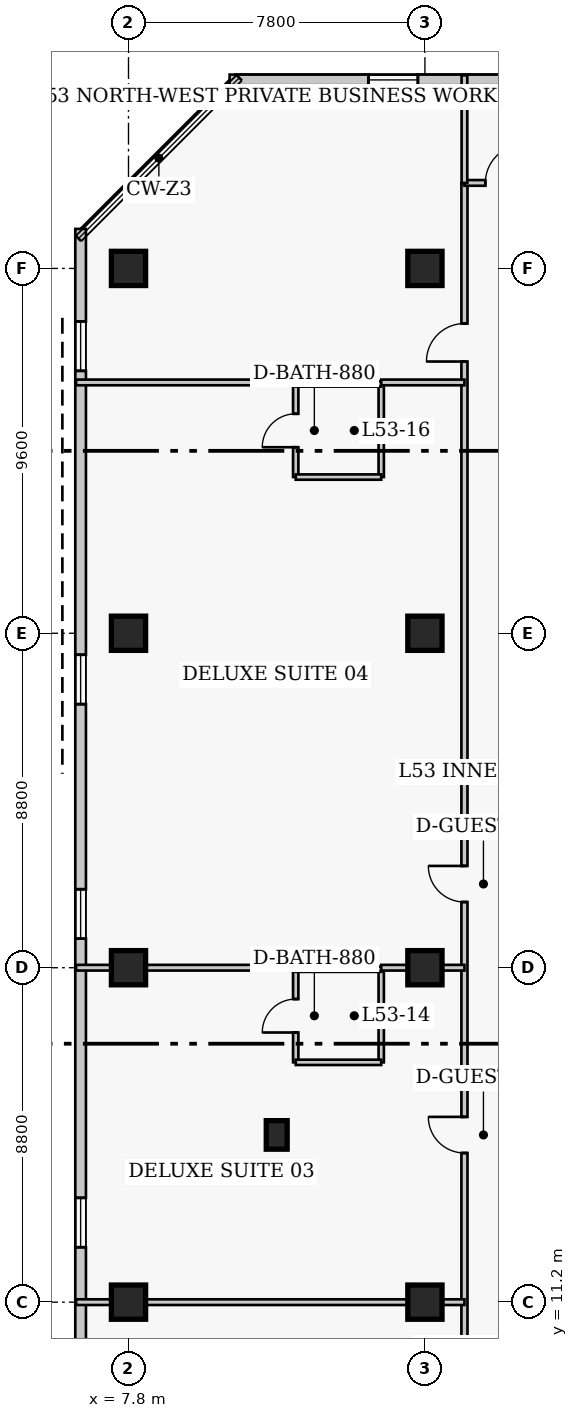
"""IFC4 building model, lengths in metres.
Left out: names, types, materials, properties, quantities, classifications, styles, units other than length and angle.
Written with IfcOpenShell. Run it as: python <this file> out.ifc"""

import sys

from ifc_helpers import new_model, si_unit, direction, frame, frame_2d, origin, origin_2d, place, context, subcontext, project, spatial, rectangle, extrude, element, fill, save


model = new_model("IFC4")
c1 = context("Model", 3, precision=1e-05, world=origin(), true_north=direction((0.0, 1.0)))
c2 = subcontext(c1, "Body", "Model", "MODEL_VIEW")
j1 = project(units=[si_unit("LENGTHUNIT", "METRE"), si_unit("PLANEANGLEUNIT", "RADIAN")], contexts=[c1])
p1 = place(None, origin())
s1 = spatial("IfcSite", under=j1, at=p1, CompositionType="ELEMENT")
p2 = place(p1, origin())
s2 = spatial("IfcBuilding", under=s1, at=p2, CompositionType="ELEMENT")
p3 = place(p2, frame((0.0, 0.0, 212.4)))
s3 = spatial("IfcBuildingStorey", under=s2, at=p3, CompositionType="ELEMENT", Elevation=212.4)
for number, where, z_axis, x_axis in (
    (1, (7.8, 11.2, 0.0), (0.0, 0.0, 1.0), (1.0, 0.0, 0.0)),
    (2, (7.8, 20.0, 0.0), (0.0, 0.0, 1.0), (1.0, 0.0, 0.0)),
    (3, (7.8, 28.8, 0.0), (0.0, 0.0, 1.0), (1.0, 0.0, 0.0)),
    (4, (7.8, 38.4, 0.0), (0.0, 0.0, 1.0), (1.0, 0.0, 0.0)),
    (5, (15.6, 11.2, 0.0), (0.0, 0.0, 1.0), (1.0, 0.0, 0.0)),
    (6, (15.6, 20.0, 0.0), (0.0, 0.0, 1.0), (1.0, 0.0, 0.0)),
    (7, (15.6, 28.8, 0.0), (0.0, 0.0, 1.0), (1.0, 0.0, 0.0)),
    (8, (15.6, 38.4, 0.0), (0.0, 0.0, 1.0), (1.0, 0.0, 0.0)),
):
    element("IfcColumn", number, at=place(p3, frame(where, z_axis=z_axis, x_axis=x_axis)), inside=s3, PredefinedType="COLUMN", context=c2, shape_type="SweptSolid", body=[
        extrude(rectangle(XDim=0.9, YDim=0.9, at=origin_2d()), origin(), (0.0, 0.0, 1.0), 3.9),
    ])
p4 = place(p3, frame((11.7, 15.6, 0.0), z_axis=(0.0, 0.0, 1.0), x_axis=(1.0, 0.0, 0.0)))
e9 = element("IfcColumn", 9, at=p4, inside=s3, PredefinedType="PILASTER", context=c2, shape_type="SweptSolid", body=[
    extrude(rectangle(XDim=0.55, YDim=0.75, at=origin_2d()), origin(), (0.0, 0.0, 1.0), 3.9),
])
p5 = place(p3, frame((36.29, 43.36, 0.0), z_axis=(0.0, 0.0, 1.0), x_axis=(-1.0, 0.0, 0.0)))
e10 = element("IfcWall", 10, at=p5, inside=s3, PredefinedType="SOLIDWALL", context=c2, shape_type="SweptSolid", body=[
    extrude(rectangle(XDim=25.83, YDim=0.28, at=frame_2d((12.915, 0.0))), origin(), (0.0, 0.0, 1.0), 3.65),
])
p6 = place(p5, frame((7.29, 0.0, 0.0)))
e11 = element("IfcOpeningElement", 11, at=p6, cuts=e10, PredefinedType="OPENING", context=c2, shape_type="SweptSolid", body=[
    extrude(rectangle(XDim=1.4, YDim=2.15, at=frame_2d((0.7, 1.075))), frame((0.0, 0.15, 0.0), z_axis=(0.0, -1.0, 0.0), x_axis=(1.0, 0.0, 0.0)), (0.0, 0.0, 1.0), 0.3),
])
p7 = place(p5, frame((3.005, 0.0, 0.85)))
e12 = element("IfcOpeningElement", 12, at=p7, cuts=e10, PredefinedType="OPENING", context=c2, shape_type="SweptSolid", body=[
    extrude(rectangle(XDim=1.3, YDim=1.7, at=frame_2d((0.65, 0.85))), frame((0.0, 0.15, 0.0), z_axis=(0.0, -1.0, 0.0), x_axis=(1.0, 0.0, 0.0)), (0.0, 0.0, 1.0), 0.3),
])
p8 = place(p5, frame((12.265, 0.0, 0.85)))
e13 = element("IfcOpeningElement", 13, at=p8, cuts=e10, PredefinedType="OPENING", context=c2, shape_type="SweptSolid", body=[
    extrude(rectangle(XDim=1.3, YDim=1.7, at=frame_2d((0.65, 0.85))), frame((0.0, 0.15, 0.0), z_axis=(0.0, -1.0, 0.0), x_axis=(1.0, 0.0, 0.0)), (0.0, 0.0, 1.0), 0.3),
])
p9 = place(p5, frame((20.875, 0.0, 0.85)))
e14 = element("IfcOpeningElement", 14, at=p9, cuts=e10, PredefinedType="OPENING", context=c2, shape_type="SweptSolid", body=[
    extrude(rectangle(XDim=1.3, YDim=1.7, at=frame_2d((0.65, 0.85))), frame((0.0, 0.15, 0.0), z_axis=(0.0, -1.0, 0.0), x_axis=(1.0, 0.0, 0.0)), (0.0, 0.0, 1.0), 0.3),
])
p10 = place(p3, frame((6.54, 39.44, 0.0), z_axis=(0.0, 0.0, 1.0), x_axis=(0.0, -1.0, 0.0)))
e15 = element("IfcWall", 15, at=p10, inside=s3, PredefinedType="SOLIDWALL", context=c2, shape_type="SweptSolid", body=[
    extrude(rectangle(XDim=29.88, YDim=0.28, at=frame_2d((14.94, 0.0))), origin(), (0.0, 0.0, 1.0), 3.65),
])
p11 = place(p10, frame((2.435, 0.0, 0.85)))
e16 = element("IfcOpeningElement", 16, at=p11, cuts=e15, PredefinedType="OPENING", context=c2, shape_type="SweptSolid", body=[
    extrude(rectangle(XDim=1.3, YDim=1.7, at=frame_2d((0.65, 0.85))), frame((0.0, 0.15, 0.0), z_axis=(0.0, -1.0, 0.0), x_axis=(1.0, 0.0, 0.0)), (0.0, 0.0, 1.0), 0.3),
])
p12 = place(p10, frame((11.205, 0.0, 0.85)))
e17 = element("IfcOpeningElement", 17, at=p12, cuts=e15, PredefinedType="OPENING", context=c2, shape_type="SweptSolid", body=[
    extrude(rectangle(XDim=1.3, YDim=1.7, at=frame_2d((0.65, 0.85))), frame((0.0, 0.15, 0.0), z_axis=(0.0, -1.0, 0.0), x_axis=(1.0, 0.0, 0.0)), (0.0, 0.0, 1.0), 0.3),
])
p13 = place(p10, frame((17.375, 0.0, 0.85)))
e18 = element("IfcOpeningElement", 18, at=p13, cuts=e15, PredefinedType="OPENING", context=c2, shape_type="SweptSolid", body=[
    extrude(rectangle(XDim=1.3, YDim=1.7, at=frame_2d((0.65, 0.85))), frame((0.0, 0.15, 0.0), z_axis=(0.0, -1.0, 0.0), x_axis=(1.0, 0.0, 0.0)), (0.0, 0.0, 1.0), 0.3),
])
p14 = place(p10, frame((25.495, 0.0, 0.85)))
e19 = element("IfcOpeningElement", 19, at=p14, cuts=e15, PredefinedType="OPENING", context=c2, shape_type="SweptSolid", body=[
    extrude(rectangle(XDim=1.3, YDim=1.7, at=frame_2d((0.65, 0.85))), frame((0.0, 0.15, 0.0), z_axis=(0.0, -1.0, 0.0), x_axis=(1.0, 0.0, 0.0)), (0.0, 0.0, 1.0), 0.3),
])
p15 = place(p3, frame((16.64, 7.55, 0.0), z_axis=(0.0, 0.0, 1.0), x_axis=(0.0, 1.0, 0.0)))
e20 = element("IfcWall", 20, at=p15, inside=s3, PredefinedType="PARTITIONING", context=c2, shape_type="SweptSolid", body=[
    extrude(rectangle(XDim=33.1, YDim=0.16, at=frame_2d((16.55, 0.0))), origin(), (0.0, 0.0, 1.0), 3.65),
])
p16 = place(p15, frame((0.46, 0.0, 0.0)))
e21 = element("IfcOpeningElement", 21, at=p16, cuts=e20, PredefinedType="OPENING", context=c2, shape_type="SweptSolid", body=[
    extrude(rectangle(XDim=0.95, YDim=2.1, at=frame_2d((0.475, 1.05))), frame((0.0, 0.09, 0.0), z_axis=(0.0, -1.0, 0.0), x_axis=(1.0, 0.0, 0.0)), (0.0, 0.0, 1.0), 0.18),
])
p17 = place(p15, frame((7.575, 0.0, 0.0)))
e22 = element("IfcOpeningElement", 22, at=p17, cuts=e20, PredefinedType="OPENING", context=c2, shape_type="SweptSolid", body=[
    extrude(rectangle(XDim=0.95, YDim=2.1, at=frame_2d((0.475, 1.05))), frame((0.0, 0.09, 0.0), z_axis=(0.0, -1.0, 0.0), x_axis=(1.0, 0.0, 0.0)), (0.0, 0.0, 1.0), 0.18),
])
p18 = place(p15, frame((14.178, 0.0, 0.0)))
e23 = element("IfcOpeningElement", 23, at=p18, cuts=e20, PredefinedType="OPENING", context=c2, shape_type="SweptSolid", body=[
    extrude(rectangle(XDim=0.95, YDim=2.1, at=frame_2d((0.475, 1.05))), frame((0.0, 0.09, 0.0), z_axis=(0.0, -1.0, 0.0), x_axis=(1.0, 0.0, 0.0)), (0.0, 0.0, 1.0), 0.18),
])
p19 = place(p15, frame((28.4, 0.0, 0.0)))
e24 = element("IfcOpeningElement", 24, at=p19, cuts=e20, PredefinedType="OPENING", context=c2, shape_type="SweptSolid", body=[
    extrude(rectangle(XDim=1.0, YDim=2.15, at=frame_2d((0.5, 1.075))), frame((0.0, 0.09, 0.0), z_axis=(0.0, -1.0, 0.0), x_axis=(1.0, 0.0, 0.0)), (0.0, 0.0, 1.0), 0.18),
])
p20 = place(p3, frame((16.64, 40.65, 0.0), z_axis=(0.0, 0.0, 1.0), x_axis=(1.0, 0.0, 0.0)))
e25 = element("IfcWall", 25, at=p20, inside=s3, PredefinedType="PARTITIONING", context=c2, shape_type="SweptSolid", body=[
    extrude(rectangle(XDim=5.46, YDim=0.15, at=frame_2d((2.73, 0.0))), origin(), (0.0, 0.0, 1.0), 3.65),
])
p21 = place(p20, frame((0.55, 0.0, 0.0)))
e26 = element("IfcOpeningElement", 26, at=p21, cuts=e25, PredefinedType="OPENING", context=c2, shape_type="SweptSolid", body=[
    extrude(rectangle(XDim=1.0, YDim=2.15, at=frame_2d((0.5, 1.075))), frame((0.0, 0.085, 0.0), z_axis=(0.0, -1.0, 0.0), x_axis=(1.0, 0.0, 0.0)), (0.0, 0.0, 1.0), 0.17),
])
p22 = place(p3, frame((16.64, 40.65, 0.0), z_axis=(0.0, 0.0, 1.0), x_axis=(0.0, 1.0, 0.0)))
e27 = element("IfcWall", 27, at=p22, inside=s3, PredefinedType="PARTITIONING", context=c2, shape_type="SweptSolid", body=[
    extrude(rectangle(XDim=2.83, YDim=0.15, at=frame_2d((1.415, 0.0))), origin(), (0.0, 0.0, 1.0), 3.65),
])
p23 = place(p3, frame((6.42, 11.2, 0.0), z_axis=(0.0, 0.0, 1.0), x_axis=(1.0, 0.0, 0.0)))
e28 = element("IfcWall", 28, at=p23, inside=s3, PredefinedType="PARTITIONING", context=c2, shape_type="SweptSolid", body=[
    extrude(rectangle(XDim=10.22, YDim=0.15, at=frame_2d((5.11, 0.0))), origin(), (0.0, 0.0, 1.0), 2.878),
])
p24 = place(p3, frame((12.2, 17.51, 0.0), z_axis=(0.0, 0.0, 1.0), x_axis=(0.0, 1.0, 0.0)))
e29 = element("IfcWall", 29, at=p24, inside=s3, PredefinedType="PLUMBINGWALL", context=c2, shape_type="SweptSolid", body=[
    extrude(rectangle(XDim=2.45, YDim=0.14, at=frame_2d((1.225, 0.0))), origin(), (0.0, 0.0, 1.0), 3.65),
])
p25 = place(p24, frame((0.785, 0.0, 0.0)))
e30 = element("IfcOpeningElement", 30, at=p25, cuts=e29, PredefinedType="OPENING", context=c2, shape_type="SweptSolid", body=[
    extrude(rectangle(XDim=0.88, YDim=2.05, at=frame_2d((0.44, 1.025))), frame((0.0, 0.08, 0.0), z_axis=(0.0, -1.0, 0.0), x_axis=(1.0, 0.0, 0.0)), (0.0, 0.0, 1.0), 0.16),
])
p26 = place(p3, frame((14.45, 17.51, 0.0), z_axis=(0.0, 0.0, 1.0), x_axis=(0.0, 1.0, 0.0)))
e31 = element("IfcWall", 31, at=p26, inside=s3, PredefinedType="PLUMBINGWALL", context=c2, shape_type="SweptSolid", body=[
    extrude(rectangle(XDim=2.45, YDim=0.14, at=frame_2d((1.225, 0.0))), origin(), (0.0, 0.0, 1.0), 3.65),
])
p27 = place(p3, frame((12.2, 17.51, 0.0), z_axis=(0.0, 0.0, 1.0), x_axis=(1.0, 0.0, 0.0)))
e32 = element("IfcWall", 32, at=p27, inside=s3, PredefinedType="PLUMBINGWALL", context=c2, shape_type="SweptSolid", body=[
    extrude(rectangle(XDim=2.25, YDim=0.14, at=frame_2d((1.125, 0.0))), origin(), (0.0, 0.0, 1.0), 3.65),
])
p28 = place(p3, frame((12.2, 19.96, 0.0), z_axis=(0.0, 0.0, 1.0), x_axis=(1.0, 0.0, 0.0)))
e33 = element("IfcWall", 33, at=p28, inside=s3, PredefinedType="PLUMBINGWALL", context=c2, shape_type="SweptSolid", body=[
    extrude(rectangle(XDim=2.25, YDim=0.14, at=frame_2d((1.125, 0.0))), origin(), (0.0, 0.0, 1.0), 3.038),
])
p29 = place(p3, frame((6.42, 20.0, 0.0), z_axis=(0.0, 0.0, 1.0), x_axis=(1.0, 0.0, 0.0)))
e34 = element("IfcWall", 34, at=p29, inside=s3, PredefinedType="PARTITIONING", context=c2, shape_type="SweptSolid", body=[
    extrude(rectangle(XDim=5.78, YDim=0.15, at=frame_2d((2.89, 0.0))), origin(), (0.0, 0.0, 1.0), 2.878),
])
p30 = place(p3, frame((14.45, 20.0, 0.0), z_axis=(0.0, 0.0, 1.0), x_axis=(1.0, 0.0, 0.0)))
e35 = element("IfcWall", 35, at=p30, inside=s3, PredefinedType="PARTITIONING", context=c2, shape_type="SweptSolid", body=[
    extrude(rectangle(XDim=2.19, YDim=0.15, at=frame_2d((1.095, 0.0))), origin(), (0.0, 0.0, 1.0), 2.878),
])
p31 = place(p3, frame((12.2, 32.91, 0.0), z_axis=(0.0, 0.0, 1.0), x_axis=(0.0, 1.0, 0.0)))
e36 = element("IfcWall", 36, at=p31, inside=s3, PredefinedType="PLUMBINGWALL", context=c2, shape_type="SweptSolid", body=[
    extrude(rectangle(XDim=2.45, YDim=0.14, at=frame_2d((1.225, 0.0))), origin(), (0.0, 0.0, 1.0), 3.65),
])
p32 = place(p31, frame((0.785, 0.0, 0.0)))
e37 = element("IfcOpeningElement", 37, at=p32, cuts=e36, PredefinedType="OPENING", context=c2, shape_type="SweptSolid", body=[
    extrude(rectangle(XDim=0.88, YDim=2.05, at=frame_2d((0.44, 1.025))), frame((0.0, 0.08, 0.0), z_axis=(0.0, -1.0, 0.0), x_axis=(1.0, 0.0, 0.0)), (0.0, 0.0, 1.0), 0.16),
])
p33 = place(p3, frame((14.45, 32.91, 0.0), z_axis=(0.0, 0.0, 1.0), x_axis=(0.0, 1.0, 0.0)))
e38 = element("IfcWall", 38, at=p33, inside=s3, PredefinedType="PLUMBINGWALL", context=c2, shape_type="SweptSolid", body=[
    extrude(rectangle(XDim=2.45, YDim=0.14, at=frame_2d((1.225, 0.0))), origin(), (0.0, 0.0, 1.0), 3.65),
])
for number, where, z_axis, x_axis in (
    (39, (12.2, 32.91, 0.0), (0.0, 0.0, 1.0), (1.0, 0.0, 0.0)),
    (40, (12.2, 35.36, 0.0), (0.0, 0.0, 1.0), (1.0, 0.0, 0.0)),
):
    element("IfcWall", number, at=place(p3, frame(where, z_axis=z_axis, x_axis=x_axis)), inside=s3, PredefinedType="PLUMBINGWALL", context=c2, shape_type="SweptSolid", body=[
        extrude(rectangle(XDim=2.25, YDim=0.14, at=frame_2d((1.125, 0.0))), origin(), (0.0, 0.0, 1.0), 3.65),
    ])
p34 = place(p3, frame((6.42, 35.4, 0.0), z_axis=(0.0, 0.0, 1.0), x_axis=(1.0, 0.0, 0.0)))
e41 = element("IfcWall", 41, at=p34, inside=s3, PredefinedType="PARTITIONING", context=c2, shape_type="SweptSolid", body=[
    extrude(rectangle(XDim=5.78, YDim=0.15, at=frame_2d((2.89, 0.0))), origin(), (0.0, 0.0, 1.0), 3.65),
])
p35 = place(p3, frame((14.45, 35.4, 0.0), z_axis=(0.0, 0.0, 1.0), x_axis=(1.0, 0.0, 0.0)))
e42 = element("IfcWall", 42, at=p35, inside=s3, PredefinedType="PARTITIONING", context=c2, shape_type="SweptSolid", body=[
    extrude(rectangle(XDim=2.19, YDim=0.15, at=frame_2d((1.095, 0.0))), origin(), (0.0, 0.0, 1.0), 3.65),
])
p36 = place(p9, origin())
e43 = element("IfcWindow", 43, at=p36, inside=s3, PartitioningType="SINGLE_PANEL", PredefinedType="WINDOW", context=c2, shape_type="SweptSolid", body=[
    extrude(rectangle(XDim=1.3, YDim=1.7, at=frame_2d((0.65, 0.85))), frame((0.0, 0.03, 0.0), z_axis=(0.0, -1.0, 0.0), x_axis=(1.0, 0.0, 0.0)), (0.0, 0.0, 1.0), 0.06),
])
fill(e14, e43)
p37 = place(p11, origin())
e44 = element("IfcWindow", 44, at=p37, inside=s3, PartitioningType="SINGLE_PANEL", PredefinedType="WINDOW", context=c2, shape_type="SweptSolid", body=[
    extrude(rectangle(XDim=1.3, YDim=1.7, at=frame_2d((0.65, 0.85))), frame((0.0, 0.03, 0.0), z_axis=(0.0, -1.0, 0.0), x_axis=(1.0, 0.0, 0.0)), (0.0, 0.0, 1.0), 0.06),
])
fill(e16, e44)
p38 = place(p12, origin())
e45 = element("IfcWindow", 45, at=p38, inside=s3, PartitioningType="SINGLE_PANEL", PredefinedType="WINDOW", context=c2, shape_type="SweptSolid", body=[
    extrude(rectangle(XDim=1.3, YDim=1.7, at=frame_2d((0.65, 0.85))), frame((0.0, 0.03, 0.0), z_axis=(0.0, -1.0, 0.0), x_axis=(1.0, 0.0, 0.0)), (0.0, 0.0, 1.0), 0.06),
])
fill(e17, e45)
p39 = place(p13, origin())
e46 = element("IfcWindow", 46, at=p39, inside=s3, PartitioningType="SINGLE_PANEL", PredefinedType="WINDOW", context=c2, shape_type="SweptSolid", body=[
    extrude(rectangle(XDim=1.3, YDim=1.7, at=frame_2d((0.65, 0.85))), frame((0.0, 0.03, 0.0), z_axis=(0.0, -1.0, 0.0), x_axis=(1.0, 0.0, 0.0)), (0.0, 0.0, 1.0), 0.06),
])
fill(e18, e46)
p40 = place(p14, origin())
e47 = element("IfcWindow", 47, at=p40, inside=s3, PartitioningType="SINGLE_PANEL", PredefinedType="WINDOW", context=c2, shape_type="SweptSolid", body=[
    extrude(rectangle(XDim=1.3, YDim=1.7, at=frame_2d((0.65, 0.85))), frame((0.0, 0.03, 0.0), z_axis=(0.0, -1.0, 0.0), x_axis=(1.0, 0.0, 0.0)), (0.0, 0.0, 1.0), 0.06),
])
fill(e19, e47)
p41 = place(p21, origin())
e48 = element("IfcDoor", 48, at=p41, inside=s3, OperationType="SINGLE_SWING_RIGHT", PredefinedType="DOOR", context=c2, shape_type="SweptSolid", body=[
    extrude(rectangle(XDim=1.0, YDim=2.15, at=frame_2d((0.5, 1.075))), frame((0.0, 0.025, 0.0), z_axis=(0.0, -1.0, 0.0), x_axis=(1.0, 0.0, 0.0)), (0.0, 0.0, 1.0), 0.05),
])
fill(e26, e48)
p42 = place(p25, origin())
e49 = element("IfcDoor", 49, at=p42, inside=s3, OperationType="SINGLE_SWING_LEFT", PredefinedType="DOOR", context=c2, shape_type="SweptSolid", body=[
    extrude(rectangle(XDim=0.88, YDim=2.05, at=frame_2d((0.44, 1.025))), frame((0.0, 0.025, 0.0), z_axis=(0.0, -1.0, 0.0), x_axis=(1.0, 0.0, 0.0)), (0.0, 0.0, 1.0), 0.05),
])
fill(e30, e49)
p43 = place(p17, origin())
e50 = element("IfcDoor", 50, at=p43, inside=s3, OperationType="SINGLE_SWING_RIGHT", PredefinedType="DOOR", context=c2, shape_type="SweptSolid", body=[
    extrude(rectangle(XDim=0.95, YDim=2.1, at=frame_2d((0.475, 1.05))), frame((0.0, 0.025, 0.0), z_axis=(0.0, -1.0, 0.0), x_axis=(1.0, 0.0, 0.0)), (0.0, 0.0, 1.0), 0.05),
])
fill(e22, e50)
p44 = place(p32, origin())
e51 = element("IfcDoor", 51, at=p44, inside=s3, OperationType="SINGLE_SWING_LEFT", PredefinedType="DOOR", context=c2, shape_type="SweptSolid", body=[
    extrude(rectangle(XDim=0.88, YDim=2.05, at=frame_2d((0.44, 1.025))), frame((0.0, 0.025, 0.0), z_axis=(0.0, -1.0, 0.0), x_axis=(1.0, 0.0, 0.0)), (0.0, 0.0, 1.0), 0.05),
])
fill(e37, e51)
p45 = place(p18, origin())
e52 = element("IfcDoor", 52, at=p45, inside=s3, OperationType="SINGLE_SWING_RIGHT", PredefinedType="DOOR", context=c2, shape_type="SweptSolid", body=[
    extrude(rectangle(XDim=0.95, YDim=2.1, at=frame_2d((0.475, 1.05))), frame((0.0, 0.025, 0.0), z_axis=(0.0, -1.0, 0.0), x_axis=(1.0, 0.0, 0.0)), (0.0, 0.0, 1.0), 0.05),
])
fill(e23, e52)
p46 = place(p19, origin())
e53 = element("IfcDoor", 53, at=p46, inside=s3, OperationType="SINGLE_SWING_LEFT", PredefinedType="DOOR", context=c2, shape_type="SweptSolid", body=[
    extrude(rectangle(XDim=1.0, YDim=2.15, at=frame_2d((0.5, 1.075))), frame((0.0, 0.025, 0.0), z_axis=(0.0, -1.0, 0.0), x_axis=(1.0, 0.0, 0.0)), (0.0, 0.0, 1.0), 0.05),
])
fill(e24, e53)
save(model, sys.argv[1])
